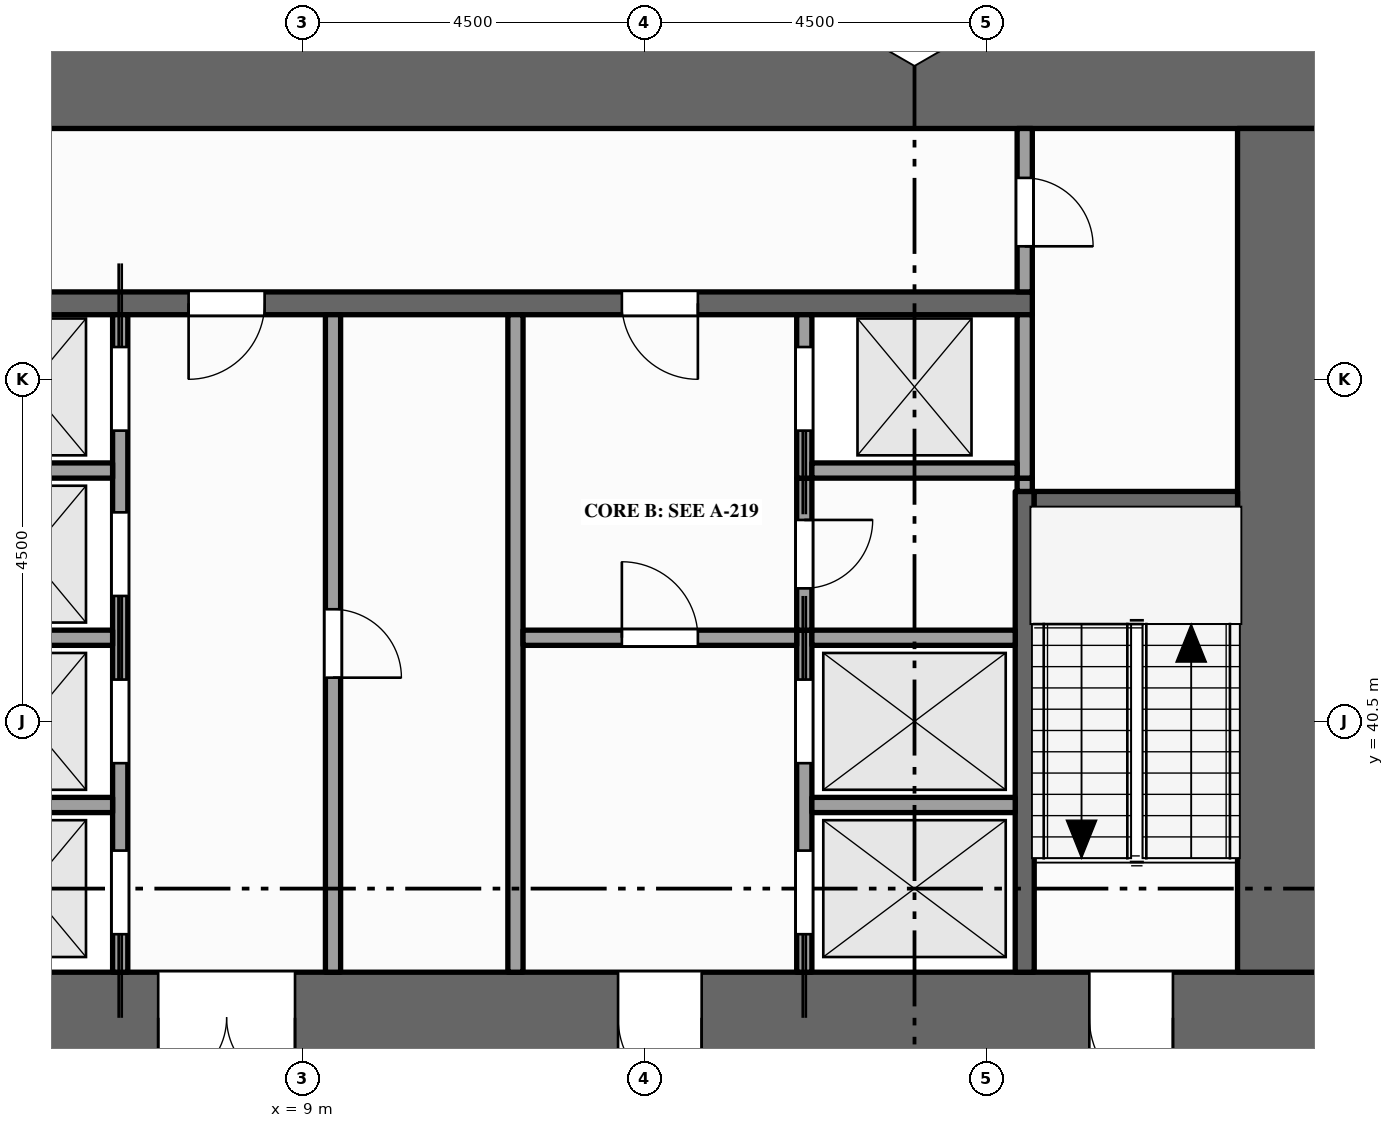
"""IFC4 building model, lengths in metres.
Left out: names, types, materials, properties, quantities, classifications, styles, units other than length and angle.
Written with IfcOpenShell. Run it as: python <this file> out.ifc"""

import sys

from ifc_helpers import new_model, si_unit, direction, frame, frame_2d, origin, place, context, subcontext, project, spatial, rectangle, extrude, element, fill, save


model = new_model("IFC4")
c1 = context("Model", 3, precision=1e-05, world=origin(), true_north=direction((0.0, 1.0)))
c2 = subcontext(c1, "Body", "Model", "MODEL_VIEW")
j1 = project(units=[si_unit("LENGTHUNIT", "METRE"), si_unit("PLANEANGLEUNIT", "RADIAN")], contexts=[c1])
p1 = place(None, origin())
s1 = spatial("IfcSite", under=j1, at=p1, CompositionType="ELEMENT")
p2 = place(p1, origin())
s2 = spatial("IfcBuilding", under=s1, at=p2, CompositionType="ELEMENT")
p3 = place(p2, frame((0.0, 0.0, 107.0)))
s3 = spatial("IfcBuildingStorey", under=s2, at=p3, CompositionType="ELEMENT", Elevation=107.0)
p4 = place(p3, frame((0.0, 36.6, -0.15), z_axis=(0.0, 0.0, 1.0), x_axis=(1.0, 0.0, 0.0)))
e1 = element("IfcWall", 1, at=p4, inside=s3, PredefinedType="SHEAR", context=c2, shape_type="SweptSolid", body=[
    extrude(rectangle(XDim=22.5, YDim=1.2, at=frame_2d((11.25, 0.0))), origin(), (0.0, 0.0, 1.0), 4.0),
])
p5 = place(p4, frame((7.1, 0.0, 0.15)))
e2 = element("IfcOpeningElement", 2, at=p5, cuts=e1, PredefinedType="OPENING", context=c2, shape_type="SweptSolid", body=[
    extrude(rectangle(XDim=1.8, YDim=2.1, at=frame_2d((0.9, 1.05))), frame((0.0, 0.61, 0.0), z_axis=(0.0, -1.0, 0.0), x_axis=(1.0, 0.0, 0.0)), (0.0, 0.0, 1.0), 1.22),
])
p6 = place(p4, frame((13.15, 0.0, 0.15)))
e3 = element("IfcOpeningElement", 3, at=p6, cuts=e1, PredefinedType="OPENING", context=c2, shape_type="SweptSolid", body=[
    extrude(rectangle(XDim=1.1, YDim=2.1, at=frame_2d((0.55, 1.05))), frame((0.0, 0.61, 0.0), z_axis=(0.0, -1.0, 0.0), x_axis=(1.0, 0.0, 0.0)), (0.0, 0.0, 1.0), 1.22),
])
p7 = place(p4, frame((2.15, 0.0, 0.15)))
e4 = element("IfcOpeningElement", 4, at=p7, cuts=e1, PredefinedType="OPENING", context=c2, shape_type="SweptSolid", body=[
    extrude(rectangle(XDim=1.1, YDim=2.1, at=frame_2d((0.55, 1.05))), frame((0.0, 0.61, 0.0), z_axis=(0.0, -1.0, 0.0), x_axis=(1.0, 0.0, 0.0)), (0.0, 0.0, 1.0), 1.22),
])
p8 = place(p4, frame((19.35, 0.0, 0.15)))
e5 = element("IfcOpeningElement", 5, at=p8, cuts=e1, PredefinedType="OPENING", context=c2, shape_type="SweptSolid", body=[
    extrude(rectangle(XDim=1.1, YDim=2.1, at=frame_2d((0.55, 1.05))), frame((0.0, 0.61, 0.0), z_axis=(0.0, -1.0, 0.0), x_axis=(1.0, 0.0, 0.0)), (0.0, 0.0, 1.0), 1.22),
])
p9 = place(p3, frame((0.0, 48.9, -0.15), z_axis=(0.0, 0.0, 1.0), x_axis=(1.0, 0.0, 0.0)))
e6 = element("IfcWall", 6, at=p9, inside=s3, PredefinedType="SHEAR", context=c2, shape_type="SweptSolid", body=[
    extrude(rectangle(XDim=22.5, YDim=1.2, at=frame_2d((11.25, 0.0))), origin(), (0.0, 0.0, 1.0), 4.0),
])
p10 = place(p3, frame((21.9, 37.2, -0.15), z_axis=(0.0, 0.0, 1.0), x_axis=(0.0, 1.0, 0.0)))
e7 = element("IfcWall", 7, at=p10, inside=s3, PredefinedType="SHEAR", context=c2, shape_type="SweptSolid", body=[
    extrude(rectangle(XDim=11.1, YDim=1.2, at=frame_2d((5.55, 0.0))), origin(), (0.0, 0.0, 1.0), 4.0),
])
p11 = place(p3, frame((6.6, 37.2, 0.0), z_axis=(0.0, 0.0, 1.0), x_axis=(0.0, 1.0, 0.0)))
e8 = element("IfcWall", 8, at=p11, inside=s3, PredefinedType="SOLIDWALL", context=c2, shape_type="SweptSolid", body=[
    extrude(rectangle(XDim=8.65, YDim=0.2, at=frame_2d((4.325, 0.0))), origin(), (0.0, 0.0, 1.0), 3.85),
])
p12 = place(p11, frame((0.5, 0.0, 0.012)))
e9 = element("IfcOpeningElement", 9, at=p12, cuts=e8, PredefinedType="OPENING", context=c2, shape_type="SweptSolid", body=[
    extrude(rectangle(XDim=1.1, YDim=2.1, at=frame_2d((0.55, 1.05))), frame((0.0, 0.11, 0.0), z_axis=(0.0, -1.0, 0.0), x_axis=(1.0, 0.0, 0.0)), (0.0, 0.0, 1.0), 0.22),
])
p13 = place(p11, frame((2.75, 0.0, 0.012)))
e10 = element("IfcOpeningElement", 10, at=p13, cuts=e8, PredefinedType="OPENING", context=c2, shape_type="SweptSolid", body=[
    extrude(rectangle(XDim=1.1, YDim=2.1, at=frame_2d((0.55, 1.05))), frame((0.0, 0.11, 0.0), z_axis=(0.0, -1.0, 0.0), x_axis=(1.0, 0.0, 0.0)), (0.0, 0.0, 1.0), 0.22),
])
p14 = place(p11, frame((4.95, 0.0, 0.012)))
e11 = element("IfcOpeningElement", 11, at=p14, cuts=e8, PredefinedType="OPENING", context=c2, shape_type="SweptSolid", body=[
    extrude(rectangle(XDim=1.1, YDim=2.1, at=frame_2d((0.55, 1.05))), frame((0.0, 0.11, 0.0), z_axis=(0.0, -1.0, 0.0), x_axis=(1.0, 0.0, 0.0)), (0.0, 0.0, 1.0), 0.22),
])
p15 = place(p11, frame((7.125, 0.0, 0.012)))
e12 = element("IfcOpeningElement", 12, at=p15, cuts=e8, PredefinedType="OPENING", context=c2, shape_type="SweptSolid", body=[
    extrude(rectangle(XDim=1.1, YDim=2.1, at=frame_2d((0.55, 1.05))), frame((0.0, 0.11, 0.0), z_axis=(0.0, -1.0, 0.0), x_axis=(1.0, 0.0, 0.0)), (0.0, 0.0, 1.0), 0.22),
])
p16 = place(p3, frame((9.4, 37.2, 0.0), z_axis=(0.0, 0.0, 1.0), x_axis=(0.0, 1.0, 0.0)))
e13 = element("IfcWall", 13, at=p16, inside=s3, PredefinedType="PARTITIONING", context=c2, shape_type="SweptSolid", body=[
    extrude(rectangle(XDim=8.65, YDim=0.2, at=frame_2d((4.325, 0.0))), origin(), (0.0, 0.0, 1.0), 3.85),
])
p17 = place(p16, frame((3.875, 0.0, 0.0)))
e14 = element("IfcOpeningElement", 14, at=p17, cuts=e13, PredefinedType="OPENING", context=c2, shape_type="SweptSolid", body=[
    extrude(rectangle(XDim=0.9, YDim=2.1, at=frame_2d((0.45, 1.05))), frame((0.0, 0.11, 0.0), z_axis=(0.0, -1.0, 0.0), x_axis=(1.0, 0.0, 0.0)), (0.0, 0.0, 1.0), 0.22),
])
p18 = place(p3, frame((11.8, 37.2, 0.0), z_axis=(0.0, 0.0, 1.0), x_axis=(0.0, 1.0, 0.0)))
e15 = element("IfcWall", 15, at=p18, inside=s3, PredefinedType="PARTITIONING", context=c2, shape_type="SweptSolid", body=[
    extrude(rectangle(XDim=8.65, YDim=0.2, at=frame_2d((4.325, 0.0))), origin(), (0.0, 0.0, 1.0), 3.85),
])
p19 = place(p3, frame((15.6, 37.2, 0.0), z_axis=(0.0, 0.0, 1.0), x_axis=(0.0, 1.0, 0.0)))
e16 = element("IfcWall", 16, at=p19, inside=s3, PredefinedType="SOLIDWALL", context=c2, shape_type="SweptSolid", body=[
    extrude(rectangle(XDim=4.5, YDim=0.2, at=frame_2d((2.25, 0.0))), origin(), (0.0, 0.0, 1.0), 3.85),
])
p20 = place(p19, frame((0.5, 0.0, 0.012)))
e17 = element("IfcOpeningElement", 17, at=p20, cuts=e16, PredefinedType="OPENING", context=c2, shape_type="SweptSolid", body=[
    extrude(rectangle(XDim=1.1, YDim=2.1, at=frame_2d((0.55, 1.05))), frame((0.0, 0.11, 0.0), z_axis=(0.0, -1.0, 0.0), x_axis=(1.0, 0.0, 0.0)), (0.0, 0.0, 1.0), 0.22),
])
p21 = place(p19, frame((2.75, 0.0, 0.012)))
e18 = element("IfcOpeningElement", 18, at=p21, cuts=e16, PredefinedType="OPENING", context=c2, shape_type="SweptSolid", body=[
    extrude(rectangle(XDim=1.1, YDim=2.1, at=frame_2d((0.55, 1.05))), frame((0.0, 0.11, 0.0), z_axis=(0.0, -1.0, 0.0), x_axis=(1.0, 0.0, 0.0)), (0.0, 0.0, 1.0), 0.22),
])
p22 = place(p3, frame((15.6, 41.7, 0.0), z_axis=(0.0, 0.0, 1.0), x_axis=(0.0, 1.0, 0.0)))
e19 = element("IfcWall", 19, at=p22, inside=s3, PredefinedType="PARTITIONING", context=c2, shape_type="SweptSolid", body=[
    extrude(rectangle(XDim=2.0, YDim=0.2, at=frame_2d((1.0, 0.0))), origin(), (0.0, 0.0, 1.0), 3.85),
])
p23 = place(p22, frame((0.55, 0.0, 0.0)))
e20 = element("IfcOpeningElement", 20, at=p23, cuts=e19, PredefinedType="OPENING", context=c2, shape_type="SweptSolid", body=[
    extrude(rectangle(XDim=0.9, YDim=2.1, at=frame_2d((0.45, 1.05))), frame((0.0, 0.11, 0.0), z_axis=(0.0, -1.0, 0.0), x_axis=(1.0, 0.0, 0.0)), (0.0, 0.0, 1.0), 0.22),
])
p24 = place(p3, frame((15.6, 43.7, 0.0), z_axis=(0.0, 0.0, 1.0), x_axis=(0.0, 1.0, 0.0)))
e21 = element("IfcWall", 21, at=p24, inside=s3, PredefinedType="SOLIDWALL", context=c2, shape_type="SweptSolid", body=[
    extrude(rectangle(XDim=2.15, YDim=0.2, at=frame_2d((1.075, 0.0))), origin(), (0.0, 0.0, 1.0), 3.85),
])
p25 = place(p24, frame((0.625, 0.0, 0.012)))
e22 = element("IfcOpeningElement", 22, at=p25, cuts=e21, PredefinedType="OPENING", context=c2, shape_type="SweptSolid", body=[
    extrude(rectangle(XDim=1.1, YDim=2.1, at=frame_2d((0.55, 1.05))), frame((0.0, 0.11, 0.0), z_axis=(0.0, -1.0, 0.0), x_axis=(1.0, 0.0, 0.0)), (0.0, 0.0, 1.0), 0.22),
])
p26 = place(p3, frame((18.5, 37.2, 0.0), z_axis=(0.0, 0.0, 1.0), x_axis=(0.0, 1.0, 0.0)))
e23 = element("IfcWall", 23, at=p26, inside=s3, PredefinedType="SHEAR", context=c2, shape_type="SweptSolid", body=[
    extrude(rectangle(XDim=6.325, YDim=0.25, at=frame_2d((3.163, 0.0))), origin(), (0.0, 0.0, 1.0), 3.85),
])
p27 = place(p3, frame((18.5, 43.525, 0.0), z_axis=(0.0, 0.0, 1.0), x_axis=(0.0, 1.0, 0.0)))
e24 = element("IfcWall", 24, at=p27, inside=s3, PredefinedType="PARTITIONING", context=c2, shape_type="SweptSolid", body=[
    extrude(rectangle(XDim=0.175, YDim=0.2, at=frame_2d((0.087, 0.0))), origin(), (0.0, 0.0, 1.0), 3.85),
])
p28 = place(p3, frame((18.5, 43.7, 0.0), z_axis=(0.0, 0.0, 1.0), x_axis=(0.0, 1.0, 0.0)))
e25 = element("IfcWall", 25, at=p28, inside=s3, PredefinedType="SOLIDWALL", context=c2, shape_type="SweptSolid", body=[
    extrude(rectangle(XDim=2.15, YDim=0.2, at=frame_2d((1.075, 0.0))), origin(), (0.0, 0.0, 1.0), 3.85),
])
p29 = place(p3, frame((18.5, 46.15, 0.0), z_axis=(0.0, 0.0, 1.0), x_axis=(0.0, 1.0, 0.0)))
e26 = element("IfcWall", 26, at=p29, inside=s3, PredefinedType="PARTITIONING", context=c2, shape_type="SweptSolid", body=[
    extrude(rectangle(XDim=2.15, YDim=0.2, at=frame_2d((1.075, 0.0))), origin(), (0.0, 0.0, 1.0), 3.85),
])
p30 = place(p29, frame((0.6, 0.0, 0.0)))
e27 = element("IfcOpeningElement", 27, at=p30, cuts=e26, PredefinedType="OPENING", context=c2, shape_type="SweptSolid", body=[
    extrude(rectangle(XDim=0.9, YDim=2.1, at=frame_2d((0.45, 1.05))), frame((0.0, 0.11, 0.0), z_axis=(0.0, -1.0, 0.0), x_axis=(1.0, 0.0, 0.0)), (0.0, 0.0, 1.0), 0.22),
])
p31 = place(p3, frame((4.325, 39.4, 0.0), z_axis=(0.0, 0.0, 1.0), x_axis=(1.0, 0.0, 0.0)))
e28 = element("IfcWall", 28, at=p31, inside=s3, PredefinedType="SOLIDWALL", context=c2, shape_type="SweptSolid", body=[
    extrude(rectangle(XDim=2.175, YDim=0.2, at=frame_2d((1.087, 0.0))), origin(), (0.0, 0.0, 1.0), 3.85),
])
p32 = place(p3, frame((15.7, 39.4, 0.0), z_axis=(0.0, 0.0, 1.0), x_axis=(1.0, 0.0, 0.0)))
e29 = element("IfcWall", 29, at=p32, inside=s3, PredefinedType="SOLIDWALL", context=c2, shape_type="SweptSolid", body=[
    extrude(rectangle(XDim=2.675, YDim=0.2, at=frame_2d((1.337, 0.0))), origin(), (0.0, 0.0, 1.0), 3.85),
])
p33 = place(p3, frame((4.325, 41.6, 0.0), z_axis=(0.0, 0.0, 1.0), x_axis=(1.0, 0.0, 0.0)))
e30 = element("IfcWall", 30, at=p33, inside=s3, PredefinedType="SOLIDWALL", context=c2, shape_type="SweptSolid", body=[
    extrude(rectangle(XDim=2.175, YDim=0.2, at=frame_2d((1.087, 0.0))), origin(), (0.0, 0.0, 1.0), 3.85),
])
p34 = place(p3, frame((11.9, 41.6, 0.0), z_axis=(0.0, 0.0, 1.0), x_axis=(1.0, 0.0, 0.0)))
e31 = element("IfcWall", 31, at=p34, inside=s3, PredefinedType="PARTITIONING", context=c2, shape_type="SweptSolid", body=[
    extrude(rectangle(XDim=3.6, YDim=0.2, at=frame_2d((1.8, 0.0))), origin(), (0.0, 0.0, 1.0), 3.85),
])
p35 = place(p34, frame((1.3, 0.0, 0.0)))
e32 = element("IfcOpeningElement", 32, at=p35, cuts=e31, PredefinedType="OPENING", context=c2, shape_type="SweptSolid", body=[
    extrude(rectangle(XDim=1.0, YDim=2.1, at=frame_2d((0.5, 1.05))), frame((0.0, 0.11, 0.0), z_axis=(0.0, -1.0, 0.0), x_axis=(1.0, 0.0, 0.0)), (0.0, 0.0, 1.0), 0.22),
])
p36 = place(p3, frame((15.7, 41.6, 0.0), z_axis=(0.0, 0.0, 1.0), x_axis=(1.0, 0.0, 0.0)))
e33 = element("IfcWall", 33, at=p36, inside=s3, PredefinedType="SOLIDWALL", context=c2, shape_type="SweptSolid", body=[
    extrude(rectangle(XDim=2.675, YDim=0.2, at=frame_2d((1.337, 0.0))), origin(), (0.0, 0.0, 1.0), 3.85),
])
p37 = place(p3, frame((18.625, 43.4, 0.0), z_axis=(0.0, 0.0, 1.0), x_axis=(1.0, 0.0, 0.0)))
e34 = element("IfcWall", 34, at=p37, inside=s3, PredefinedType="SHEAR", context=c2, shape_type="SweptSolid", body=[
    extrude(rectangle(XDim=2.675, YDim=0.25, at=frame_2d((1.337, 0.0))), origin(), (0.0, 0.0, 1.0), 3.85),
])
p38 = place(p3, frame((4.3, 43.8, 0.0), z_axis=(0.0, 0.0, 1.0), x_axis=(1.0, 0.0, 0.0)))
e35 = element("IfcWall", 35, at=p38, inside=s3, PredefinedType="SOLIDWALL", context=c2, shape_type="SweptSolid", body=[
    extrude(rectangle(XDim=2.2, YDim=0.2, at=frame_2d((1.1, 0.0))), origin(), (0.0, 0.0, 1.0), 3.85),
])
p39 = place(p3, frame((15.7, 43.8, 0.0), z_axis=(0.0, 0.0, 1.0), x_axis=(1.0, 0.0, 0.0)))
e36 = element("IfcWall", 36, at=p39, inside=s3, PredefinedType="SOLIDWALL", context=c2, shape_type="SweptSolid", body=[
    extrude(rectangle(XDim=2.7, YDim=0.2, at=frame_2d((1.35, 0.0))), origin(), (0.0, 0.0, 1.0), 3.85),
])
p40 = place(p3, frame((4.1, 46.0, 0.0), z_axis=(0.0, 0.0, 1.0), x_axis=(1.0, 0.0, 0.0)))
e37 = element("IfcWall", 37, at=p40, inside=s3, PredefinedType="SHEAR", context=c2, shape_type="SweptSolid", body=[
    extrude(rectangle(XDim=14.5, YDim=0.3, at=frame_2d((7.25, 0.0))), origin(), (0.0, 0.0, 1.0), 3.85),
])
p41 = place(p40, frame((3.4, 0.0, 0.0)))
e38 = element("IfcOpeningElement", 38, at=p41, cuts=e37, PredefinedType="OPENING", context=c2, shape_type="SweptSolid", body=[
    extrude(rectangle(XDim=1.0, YDim=2.1, at=frame_2d((0.5, 1.05))), frame((0.0, 0.16, 0.0), z_axis=(0.0, -1.0, 0.0), x_axis=(1.0, 0.0, 0.0)), (0.0, 0.0, 1.0), 0.32),
])
p42 = place(p40, frame((9.1, 0.0, 0.0)))
e39 = element("IfcOpeningElement", 39, at=p42, cuts=e37, PredefinedType="OPENING", context=c2, shape_type="SweptSolid", body=[
    extrude(rectangle(XDim=1.0, YDim=2.1, at=frame_2d((0.5, 1.05))), frame((0.0, 0.16, 0.0), z_axis=(0.0, -1.0, 0.0), x_axis=(1.0, 0.0, 0.0)), (0.0, 0.0, 1.0), 0.32),
])
p43 = place(p12, origin())
e40 = element("IfcDoor", 40, at=p43, inside=s3, OperationType="SLIDING_TO_LEFT", PredefinedType="DOOR", context=c2, shape_type="SweptSolid", body=[
    extrude(rectangle(XDim=1.1, YDim=2.1, at=frame_2d((0.55, 1.05))), frame((0.0, 0.025, 0.0), z_axis=(0.0, -1.0, 0.0), x_axis=(1.0, 0.0, 0.0)), (0.0, 0.0, 1.0), 0.05),
])
fill(e9, e40)
p44 = place(p13, origin())
e41 = element("IfcDoor", 41, at=p44, inside=s3, OperationType="SLIDING_TO_RIGHT", PredefinedType="DOOR", context=c2, shape_type="SweptSolid", body=[
    extrude(rectangle(XDim=1.1, YDim=2.1, at=frame_2d((0.55, 1.05))), frame((0.0, 0.025, 0.0), z_axis=(0.0, -1.0, 0.0), x_axis=(1.0, 0.0, 0.0)), (0.0, 0.0, 1.0), 0.05),
])
fill(e10, e41)
p45 = place(p14, origin())
e42 = element("IfcDoor", 42, at=p45, inside=s3, OperationType="SLIDING_TO_LEFT", PredefinedType="DOOR", context=c2, shape_type="SweptSolid", body=[
    extrude(rectangle(XDim=1.1, YDim=2.1, at=frame_2d((0.55, 1.05))), frame((0.0, 0.025, 0.0), z_axis=(0.0, -1.0, 0.0), x_axis=(1.0, 0.0, 0.0)), (0.0, 0.0, 1.0), 0.05),
])
fill(e11, e42)
p46 = place(p15, origin())
e43 = element("IfcDoor", 43, at=p46, inside=s3, OperationType="SLIDING_TO_RIGHT", PredefinedType="DOOR", context=c2, shape_type="SweptSolid", body=[
    extrude(rectangle(XDim=1.1, YDim=2.1, at=frame_2d((0.55, 1.05))), frame((0.0, 0.025, 0.0), z_axis=(0.0, -1.0, 0.0), x_axis=(1.0, 0.0, 0.0)), (0.0, 0.0, 1.0), 0.05),
])
fill(e12, e43)
p47 = place(p20, origin())
e44 = element("IfcDoor", 44, at=p47, inside=s3, OperationType="SLIDING_TO_LEFT", PredefinedType="DOOR", context=c2, shape_type="SweptSolid", body=[
    extrude(rectangle(XDim=1.1, YDim=2.1, at=frame_2d((0.55, 1.05))), frame((0.0, 0.025, 0.0), z_axis=(0.0, -1.0, 0.0), x_axis=(1.0, 0.0, 0.0)), (0.0, 0.0, 1.0), 0.05),
])
fill(e17, e44)
p48 = place(p21, origin())
e45 = element("IfcDoor", 45, at=p48, inside=s3, OperationType="SLIDING_TO_RIGHT", PredefinedType="DOOR", context=c2, shape_type="SweptSolid", body=[
    extrude(rectangle(XDim=1.1, YDim=2.1, at=frame_2d((0.55, 1.05))), frame((0.0, 0.025, 0.0), z_axis=(0.0, -1.0, 0.0), x_axis=(1.0, 0.0, 0.0)), (0.0, 0.0, 1.0), 0.05),
])
fill(e18, e45)
p49 = place(p25, origin())
e46 = element("IfcDoor", 46, at=p49, inside=s3, OperationType="SLIDING_TO_LEFT", PredefinedType="DOOR", context=c2, shape_type="SweptSolid", body=[
    extrude(rectangle(XDim=1.1, YDim=2.1, at=frame_2d((0.55, 1.05))), frame((0.0, 0.025, 0.0), z_axis=(0.0, -1.0, 0.0), x_axis=(1.0, 0.0, 0.0)), (0.0, 0.0, 1.0), 0.05),
])
fill(e22, e46)
p50 = place(p5, origin())
e47 = element("IfcDoor", 47, at=p50, inside=s3, OperationType="DOUBLE_DOOR_SINGLE_SWING", PredefinedType="DOOR", context=c2, shape_type="SweptSolid", body=[
    extrude(rectangle(XDim=1.8, YDim=2.1, at=frame_2d((0.9, 1.05))), frame((0.0, 0.025, 0.0), z_axis=(0.0, -1.0, 0.0), x_axis=(1.0, 0.0, 0.0)), (0.0, 0.0, 1.0), 0.05),
])
fill(e2, e47)
p51 = place(p41, origin())
e48 = element("IfcDoor", 48, at=p51, inside=s3, OperationType="SINGLE_SWING_LEFT", PredefinedType="DOOR", context=c2, shape_type="SweptSolid", body=[
    extrude(rectangle(XDim=1.0, YDim=2.1, at=frame_2d((0.5, 1.05))), frame((0.0, 0.025, 0.0), z_axis=(0.0, -1.0, 0.0), x_axis=(1.0, 0.0, 0.0)), (0.0, 0.0, 1.0), 0.05),
])
fill(e38, e48)
p52 = place(p6, origin())
e49 = element("IfcDoor", 49, at=p52, inside=s3, OperationType="SINGLE_SWING_RIGHT", PredefinedType="DOOR", context=c2, shape_type="SweptSolid", body=[
    extrude(rectangle(XDim=1.1, YDim=2.1, at=frame_2d((0.55, 1.05))), frame((0.0, 0.025, 0.0), z_axis=(0.0, -1.0, 0.0), x_axis=(1.0, 0.0, 0.0)), (0.0, 0.0, 1.0), 0.05),
])
fill(e3, e49)
p53 = place(p35, origin())
e50 = element("IfcDoor", 50, at=p53, inside=s3, OperationType="SINGLE_SWING_LEFT", PredefinedType="DOOR", context=c2, shape_type="SweptSolid", body=[
    extrude(rectangle(XDim=1.0, YDim=2.1, at=frame_2d((0.5, 1.05))), frame((0.0, 0.025, 0.0), z_axis=(0.0, -1.0, 0.0), x_axis=(1.0, 0.0, 0.0)), (0.0, 0.0, 1.0), 0.05),
])
fill(e32, e50)
p54 = place(p42, origin())
e51 = element("IfcDoor", 51, at=p54, inside=s3, OperationType="SINGLE_SWING_RIGHT", PredefinedType="DOOR", context=c2, shape_type="SweptSolid", body=[
    extrude(rectangle(XDim=1.0, YDim=2.1, at=frame_2d((0.5, 1.05))), frame((0.0, 0.025, 0.0), z_axis=(0.0, -1.0, 0.0), x_axis=(1.0, 0.0, 0.0)), (0.0, 0.0, 1.0), 0.05),
])
fill(e39, e51)
p55 = place(p8, origin())
e52 = element("IfcDoor", 52, at=p55, inside=s3, OperationType="SINGLE_SWING_RIGHT", PredefinedType="DOOR", context=c2, shape_type="SweptSolid", body=[
    extrude(rectangle(XDim=1.1, YDim=2.1, at=frame_2d((0.55, 1.05))), frame((0.0, 0.025, 0.0), z_axis=(0.0, -1.0, 0.0), x_axis=(1.0, 0.0, 0.0)), (0.0, 0.0, 1.0), 0.05),
])
fill(e5, e52)
p56 = place(p30, origin())
e53 = element("IfcDoor", 53, at=p56, inside=s3, OperationType="SINGLE_SWING_LEFT", PredefinedType="DOOR", context=c2, shape_type="SweptSolid", body=[
    extrude(rectangle(XDim=0.9, YDim=2.1, at=frame_2d((0.45, 1.05))), frame((0.0, 0.025, 0.0), z_axis=(0.0, -1.0, 0.0), x_axis=(1.0, 0.0, 0.0)), (0.0, 0.0, 1.0), 0.05),
])
fill(e27, e53)
p57 = place(p17, origin())
e54 = element("IfcDoor", 54, at=p57, inside=s3, OperationType="SINGLE_SWING_LEFT", PredefinedType="DOOR", context=c2, shape_type="SweptSolid", body=[
    extrude(rectangle(XDim=0.9, YDim=2.1, at=frame_2d((0.45, 1.05))), frame((0.0, 0.025, 0.0), z_axis=(0.0, -1.0, 0.0), x_axis=(1.0, 0.0, 0.0)), (0.0, 0.0, 1.0), 0.05),
])
fill(e14, e54)
p58 = place(p23, origin())
e55 = element("IfcDoor", 55, at=p58, inside=s3, OperationType="SINGLE_SWING_RIGHT", PredefinedType="DOOR", context=c2, shape_type="SweptSolid", body=[
    extrude(rectangle(XDim=0.9, YDim=2.1, at=frame_2d((0.45, 1.05))), frame((0.0, 0.025, 0.0), z_axis=(0.0, -1.0, 0.0), x_axis=(1.0, 0.0, 0.0)), (0.0, 0.0, 1.0), 0.05),
])
fill(e20, e55)
save(model, sys.argv[1])
